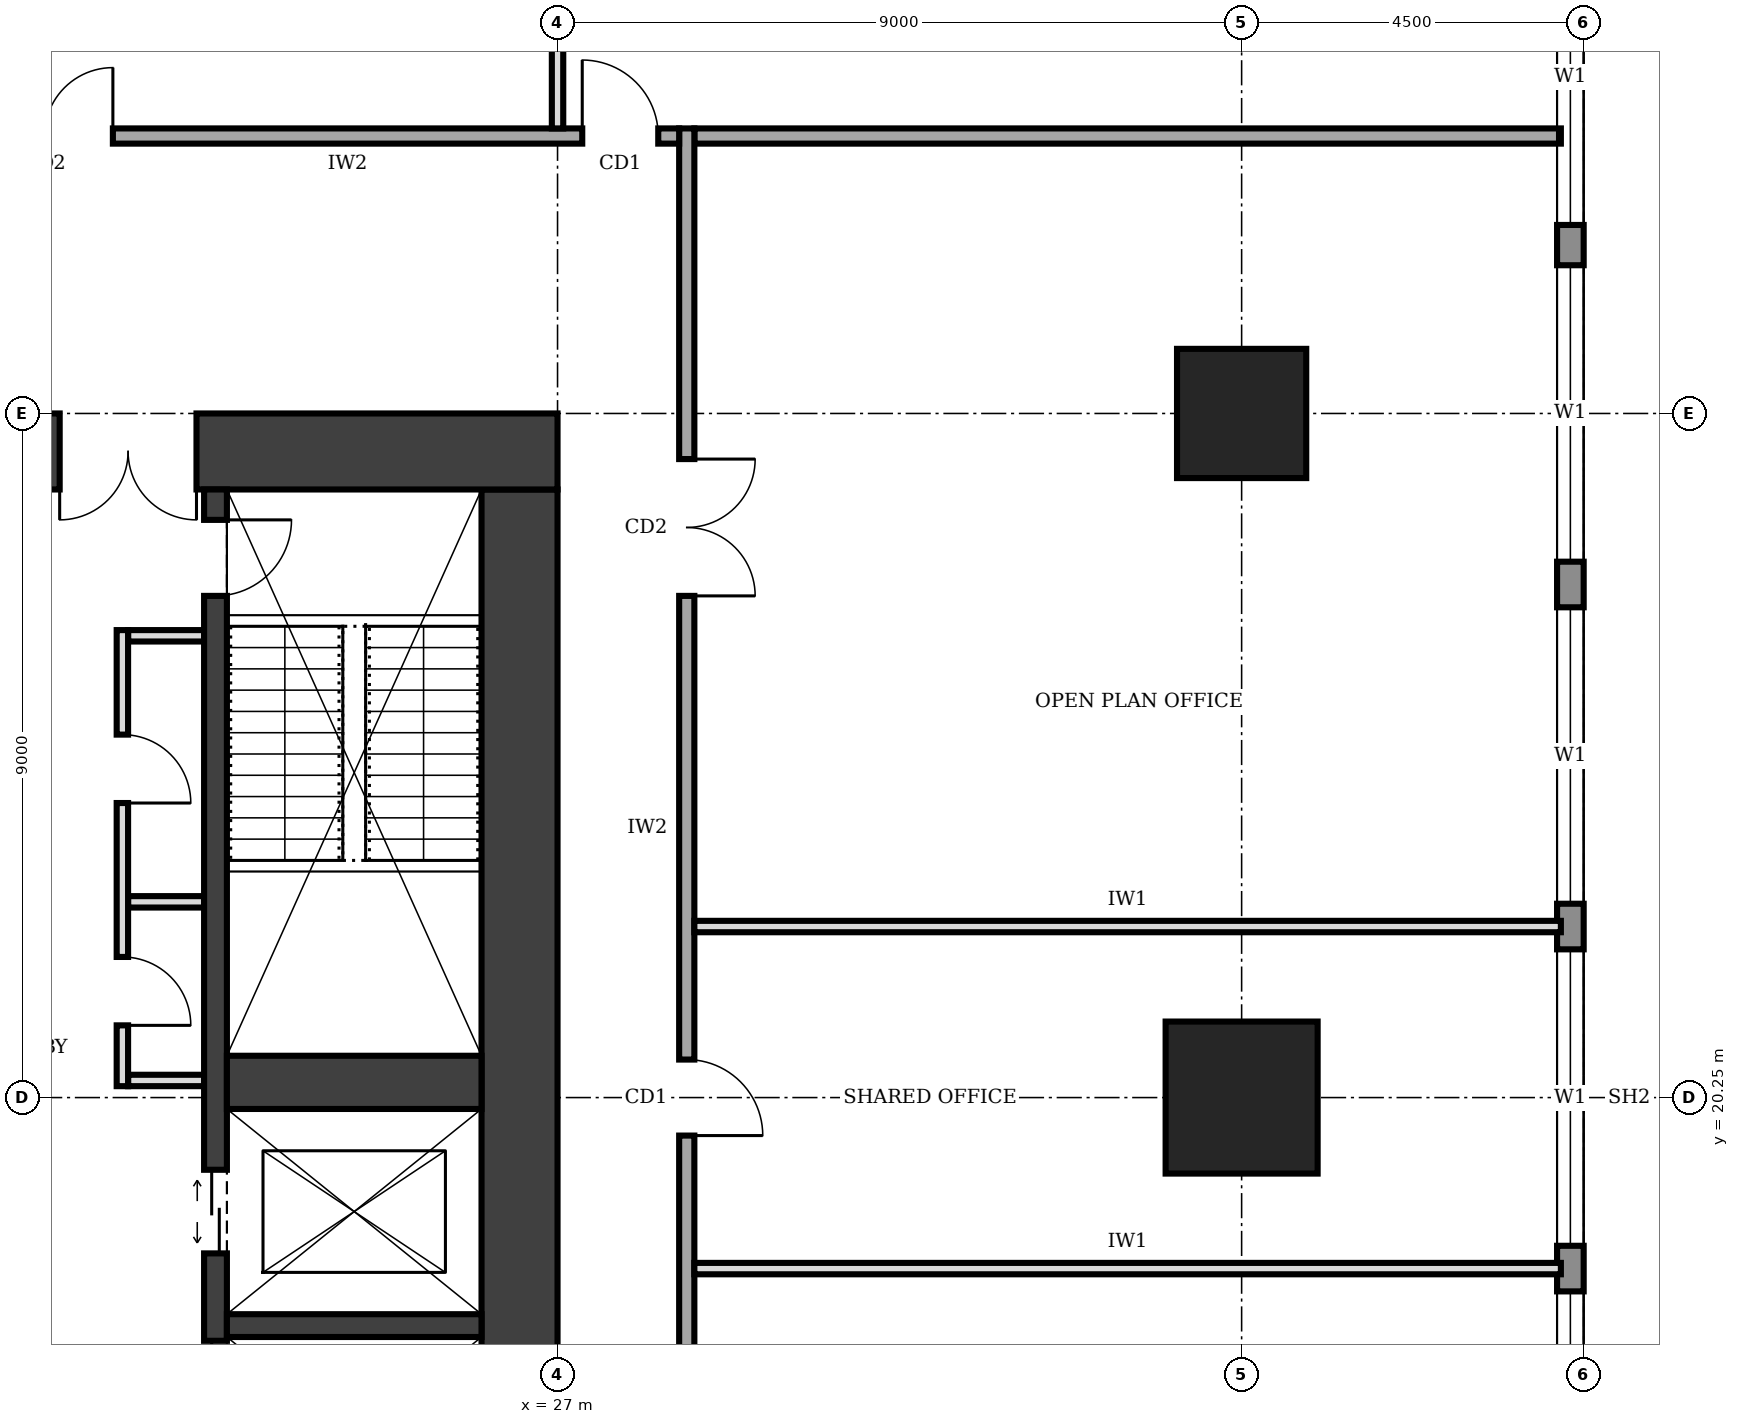
"""IFC4 building model, lengths in metres.
Left out: names, types, materials, properties, quantities, classifications, styles, units other than length and angle.
Written with IfcOpenShell. Run it as: python <this file> out.ifc"""

import sys

from ifc_helpers import new_model, si_unit, direction, frame, frame_2d, origin, origin_2d, place, context, subcontext, project, spatial, rectangle, extrude, element, fill, save


model = new_model("IFC4")
c1 = context("Model", 3, precision=1e-05, world=origin(), true_north=direction((0.0, 1.0)))
c2 = subcontext(c1, "Body", "Model", "MODEL_VIEW")
j1 = project(units=[si_unit("LENGTHUNIT", "METRE"), si_unit("PLANEANGLEUNIT", "RADIAN")], contexts=[c1])
p1 = place(None, origin())
s1 = spatial("IfcSite", under=j1, at=p1, CompositionType="ELEMENT")
p2 = place(p1, origin())
s2 = spatial("IfcBuilding", under=s1, at=p2, CompositionType="ELEMENT")
p3 = place(p2, frame((0.0, 0.0, 273.0)))
s3 = spatial("IfcBuildingStorey", under=s2, at=p3, CompositionType="ELEMENT", Elevation=273.0)
p4 = place(p3, frame((26.5, 12.25, 0.0), z_axis=(0.0, 0.0, 1.0), x_axis=(0.0, 1.0, 0.0)))
e1 = element("IfcWall", 1, at=p4, inside=s3, PredefinedType="SHEAR", context=c2, shape_type="SweptSolid", body=[
    extrude(rectangle(XDim=16.0, YDim=1.0, at=frame_2d((8.0, 0.0))), origin(), (0.0, 0.0, 1.0), 4.0),
])
p5 = place(p3, frame((27.0, 28.75, 0.0), z_axis=(0.0, 0.0, 1.0), x_axis=(-1.0, 0.0, 0.0)))
e2 = element("IfcWall", 2, at=p5, inside=s3, PredefinedType="SHEAR", context=c2, shape_type="SweptSolid", body=[
    extrude(rectangle(XDim=13.5, YDim=1.0, at=frame_2d((6.75, 0.0))), origin(), (0.0, 0.0, 1.0), 4.0),
])
p6 = place(p5, frame((4.75, 0.0, 0.0)))
e3 = element("IfcOpeningElement", 3, at=p6, cuts=e2, PredefinedType="OPENING", context=c2, shape_type="SweptSolid", body=[
    extrude(rectangle(XDim=1.8, YDim=2.1, at=frame_2d((0.9, 1.05))), frame((0.0, 0.51, 0.0), z_axis=(0.0, -1.0, 0.0), x_axis=(1.0, 0.0, 0.0)), (0.0, 0.0, 1.0), 1.02),
])
p7 = place(p3, frame((22.5, 12.25, 0.0), z_axis=(0.0, 0.0, 1.0), x_axis=(0.0, 1.0, 0.0)))
e4 = element("IfcWall", 4, at=p7, inside=s3, PredefinedType="SHEAR", context=c2, shape_type="SweptSolid", body=[
    extrude(rectangle(XDim=16.0, YDim=0.3, at=frame_2d((8.0, 0.0))), origin(), (0.0, 0.0, 1.0), 4.0),
])
p8 = place(p7, frame((14.6, 0.0, 0.0)))
e5 = element("IfcOpeningElement", 5, at=p8, cuts=e4, PredefinedType="OPENING", context=c2, shape_type="SweptSolid", body=[
    extrude(rectangle(XDim=1.0, YDim=2.1, at=frame_2d((0.5, 1.05))), frame((0.0, 0.16, 0.0), z_axis=(0.0, -1.0, 0.0), x_axis=(1.0, 0.0, 0.0)), (0.0, 0.0, 1.0), 0.32),
])
p9 = place(p7, frame((0.375, 0.0, 0.0)))
e6 = element("IfcOpeningElement", 6, at=p9, cuts=e4, PredefinedType="OPENING", context=c2, shape_type="SweptSolid", body=[
    extrude(rectangle(XDim=1.1, YDim=2.1, at=frame_2d((0.55, 1.05))), frame((0.0, 0.16, 0.0), z_axis=(0.0, -1.0, 0.0), x_axis=(1.0, 0.0, 0.0)), (0.0, 0.0, 1.0), 0.32),
])
p10 = place(p7, frame((3.7, 0.0, 0.0)))
e7 = element("IfcOpeningElement", 7, at=p10, cuts=e4, PredefinedType="OPENING", context=c2, shape_type="SweptSolid", body=[
    extrude(rectangle(XDim=1.1, YDim=2.1, at=frame_2d((0.55, 1.05))), frame((0.0, 0.16, 0.0), z_axis=(0.0, -1.0, 0.0), x_axis=(1.0, 0.0, 0.0)), (0.0, 0.0, 1.0), 0.32),
])
p11 = place(p7, frame((5.95, 0.0, 0.0)))
e8 = element("IfcOpeningElement", 8, at=p11, cuts=e4, PredefinedType="OPENING", context=c2, shape_type="SweptSolid", body=[
    extrude(rectangle(XDim=1.1, YDim=2.1, at=frame_2d((0.55, 1.05))), frame((0.0, 0.16, 0.0), z_axis=(0.0, -1.0, 0.0), x_axis=(1.0, 0.0, 0.0)), (0.0, 0.0, 1.0), 0.32),
])
p12 = place(p3, frame((22.65, 17.25, 0.0), z_axis=(0.0, 0.0, 1.0), x_axis=(1.0, 0.0, 0.0)))
e9 = element("IfcWall", 9, at=p12, inside=s3, PredefinedType="SHEAR", context=c2, shape_type="SweptSolid", body=[
    extrude(rectangle(XDim=3.35, YDim=0.3, at=frame_2d((1.675, 0.0))), origin(), (0.0, 0.0, 1.0), 4.0),
])
p13 = place(p3, frame((22.65, 20.45, 0.0), z_axis=(0.0, 0.0, 1.0), x_axis=(1.0, 0.0, 0.0)))
e10 = element("IfcWall", 10, at=p13, inside=s3, PredefinedType="SHEAR", context=c2, shape_type="SweptSolid", body=[
    extrude(rectangle(XDim=3.35, YDim=0.7, at=frame_2d((1.675, 0.0))), origin(), (0.0, 0.0, 1.0), 4.0),
])
p14 = place(p3, frame((36.0, 20.25, 0.0), z_axis=(0.0, 0.0, 1.0), x_axis=(1.0, 0.0, 0.0)))
e11 = element("IfcColumn", 11, at=p14, inside=s3, PredefinedType="COLUMN", context=c2, shape_type="SweptSolid", body=[
    extrude(rectangle(XDim=2.0, YDim=2.0, at=origin_2d()), origin(), (0.0, 0.0, 1.0), 4.0),
])
p15 = place(p3, frame((36.0, 29.25, 0.0), z_axis=(0.0, 0.0, 1.0), x_axis=(1.0, 0.0, 0.0)))
e12 = element("IfcColumn", 12, at=p15, inside=s3, PredefinedType="COLUMN", context=c2, shape_type="SweptSolid", body=[
    extrude(rectangle(XDim=1.7, YDim=1.7, at=origin_2d()), origin(), (0.0, 0.0, 1.0), 4.0),
])
p16 = place(p3, frame((40.325, 4.52, 0.0), z_axis=(0.0, 0.0, 1.0), x_axis=(0.0, 1.0, 0.0)))
e13 = element("IfcWall", 13, at=p16, inside=s3, PredefinedType="STANDARD", context=c2, shape_type="SweptSolid", body=[
    extrude(rectangle(XDim=31.46, YDim=0.35, at=frame_2d((15.73, 0.0))), origin(), (0.0, 0.0, 1.0), 3.75),
])
p17 = place(p16, frame((4.78, 0.0, 0.9)))
e14 = element("IfcOpeningElement", 14, at=p17, cuts=e13, PredefinedType="OPENING", context=c2, shape_type="SweptSolid", body=[
    extrude(rectangle(XDim=3.9, YDim=2.2, at=frame_2d((1.95, 1.1))), frame((0.0, 0.185, 0.0), z_axis=(0.0, -1.0, 0.0), x_axis=(1.0, 0.0, 0.0)), (0.0, 0.0, 1.0), 0.37),
])
p18 = place(p16, frame((9.28, 0.0, 0.9)))
e15 = element("IfcOpeningElement", 15, at=p18, cuts=e13, PredefinedType="OPENING", context=c2, shape_type="SweptSolid", body=[
    extrude(rectangle(XDim=3.9, YDim=2.2, at=frame_2d((1.95, 1.1))), frame((0.0, 0.185, 0.0), z_axis=(0.0, -1.0, 0.0), x_axis=(1.0, 0.0, 0.0)), (0.0, 0.0, 1.0), 0.37),
])
p19 = place(p16, frame((13.78, 0.0, 0.9)))
e16 = element("IfcOpeningElement", 16, at=p19, cuts=e13, PredefinedType="OPENING", context=c2, shape_type="SweptSolid", body=[
    extrude(rectangle(XDim=3.9, YDim=2.2, at=frame_2d((1.95, 1.1))), frame((0.0, 0.185, 0.0), z_axis=(0.0, -1.0, 0.0), x_axis=(1.0, 0.0, 0.0)), (0.0, 0.0, 1.0), 0.37),
])
p20 = place(p16, frame((18.28, 0.0, 0.9)))
e17 = element("IfcOpeningElement", 17, at=p20, cuts=e13, PredefinedType="OPENING", context=c2, shape_type="SweptSolid", body=[
    extrude(rectangle(XDim=3.9, YDim=2.2, at=frame_2d((1.95, 1.1))), frame((0.0, 0.185, 0.0), z_axis=(0.0, -1.0, 0.0), x_axis=(1.0, 0.0, 0.0)), (0.0, 0.0, 1.0), 0.37),
])
p21 = place(p16, frame((22.78, 0.0, 0.9)))
e18 = element("IfcOpeningElement", 18, at=p21, cuts=e13, PredefinedType="OPENING", context=c2, shape_type="SweptSolid", body=[
    extrude(rectangle(XDim=3.9, YDim=2.2, at=frame_2d((1.95, 1.1))), frame((0.0, 0.185, 0.0), z_axis=(0.0, -1.0, 0.0), x_axis=(1.0, 0.0, 0.0)), (0.0, 0.0, 1.0), 0.37),
])
p22 = place(p16, frame((27.21, 0.0, 0.9)))
e19 = element("IfcOpeningElement", 19, at=p22, cuts=e13, PredefinedType="OPENING", context=c2, shape_type="SweptSolid", body=[
    extrude(rectangle(XDim=3.9, YDim=2.2, at=frame_2d((1.95, 1.1))), frame((0.0, 0.185, 0.0), z_axis=(0.0, -1.0, 0.0), x_axis=(1.0, 0.0, 0.0)), (0.0, 0.0, 1.0), 0.37),
])
p23 = place(p3, frame((21.275, 20.4, 0.0), z_axis=(0.0, 0.0, 1.0), x_axis=(0.0, 1.0, 0.0)))
e20 = element("IfcWall", 20, at=p23, inside=s3, PredefinedType="PARTITIONING", context=c2, shape_type="SweptSolid", body=[
    extrude(rectangle(XDim=6.0, YDim=0.15, at=frame_2d((3.0, 0.0))), origin(), (0.0, 0.0, 1.0), 3.75),
])
p24 = place(p23, frame((0.8, 0.0, 0.0)))
e21 = element("IfcOpeningElement", 21, at=p24, cuts=e20, PredefinedType="OPENING", context=c2, shape_type="SweptSolid", body=[
    extrude(rectangle(XDim=0.9, YDim=2.1, at=frame_2d((0.45, 1.05))), frame((0.0, 0.085, 0.0), z_axis=(0.0, -1.0, 0.0), x_axis=(1.0, 0.0, 0.0)), (0.0, 0.0, 1.0), 0.17),
])
p25 = place(p23, frame((3.725, 0.0, 0.0)))
e22 = element("IfcOpeningElement", 22, at=p25, cuts=e20, PredefinedType="OPENING", context=c2, shape_type="SweptSolid", body=[
    extrude(rectangle(XDim=0.9, YDim=2.1, at=frame_2d((0.45, 1.05))), frame((0.0, 0.085, 0.0), z_axis=(0.0, -1.0, 0.0), x_axis=(1.0, 0.0, 0.0)), (0.0, 0.0, 1.0), 0.17),
])
for number, where, z_axis, x_axis in (
    (23, (21.35, 20.475, 0.0), (0.0, 0.0, 1.0), (1.0, 0.0, 0.0)),
    (24, (21.35, 22.825, 0.0), (0.0, 0.0, 1.0), (1.0, 0.0, 0.0)),
    (25, (21.35, 26.325, 0.0), (0.0, 0.0, 1.0), (1.0, 0.0, 0.0)),
):
    element("IfcWall", number, at=place(p3, frame(where, z_axis=z_axis, x_axis=x_axis)), inside=s3, PredefinedType="PARTITIONING", context=c2, shape_type="SweptSolid", body=[
        extrude(rectangle(XDim=1.0, YDim=0.15, at=frame_2d((0.5, 0.0))), origin(), (0.0, 0.0, 1.0), 3.75),
    ])
p26 = place(p3, frame((28.7, 9.2, 0.0), z_axis=(0.0, 0.0, 1.0), x_axis=(0.0, 1.0, 0.0)))
e26 = element("IfcWall", 26, at=p26, inside=s3, PredefinedType="SOLIDWALL", context=c2, shape_type="SweptSolid", body=[
    extrude(rectangle(XDim=23.8, YDim=0.2, at=frame_2d((11.9, 0.0))), origin(), (0.0, 0.0, 1.0), 3.75),
])
p27 = place(p26, frame((3.4, 0.0, 0.0)))
e27 = element("IfcOpeningElement", 27, at=p27, cuts=e26, PredefinedType="OPENING", context=c2, shape_type="SweptSolid", body=[
    extrude(rectangle(XDim=1.8, YDim=2.1, at=frame_2d((0.9, 1.05))), frame((0.0, 0.11, 0.0), z_axis=(0.0, -1.0, 0.0), x_axis=(1.0, 0.0, 0.0)), (0.0, 0.0, 1.0), 0.22),
])
p28 = place(p26, frame((10.55, 0.0, 0.0)))
e28 = element("IfcOpeningElement", 28, at=p28, cuts=e26, PredefinedType="OPENING", context=c2, shape_type="SweptSolid", body=[
    extrude(rectangle(XDim=1.0, YDim=2.1, at=frame_2d((0.5, 1.05))), frame((0.0, 0.11, 0.0), z_axis=(0.0, -1.0, 0.0), x_axis=(1.0, 0.0, 0.0)), (0.0, 0.0, 1.0), 0.22),
])
p29 = place(p26, frame((17.65, 0.0, 0.0)))
e29 = element("IfcOpeningElement", 29, at=p29, cuts=e26, PredefinedType="OPENING", context=c2, shape_type="SweptSolid", body=[
    extrude(rectangle(XDim=1.8, YDim=2.1, at=frame_2d((0.9, 1.05))), frame((0.0, 0.11, 0.0), z_axis=(0.0, -1.0, 0.0), x_axis=(1.0, 0.0, 0.0)), (0.0, 0.0, 1.0), 0.22),
])
p30 = place(p3, frame((28.6, 32.9, 0.0), z_axis=(0.0, 0.0, 1.0), x_axis=(-1.0, 0.0, 0.0)))
e30 = element("IfcWall", 30, at=p30, inside=s3, PredefinedType="SOLIDWALL", context=c2, shape_type="SweptSolid", body=[
    extrude(rectangle(XDim=16.9, YDim=0.2, at=frame_2d((8.45, 0.0))), origin(), (0.0, 0.0, 1.0), 3.75),
])
p31 = place(p30, frame((15.425, 0.0, 0.0)))
e31 = element("IfcOpeningElement", 31, at=p31, cuts=e30, PredefinedType="OPENING", context=c2, shape_type="SweptSolid", body=[
    extrude(rectangle(XDim=1.0, YDim=2.1, at=frame_2d((0.5, 1.05))), frame((0.0, 0.11, 0.0), z_axis=(0.0, -1.0, 0.0), x_axis=(1.0, 0.0, 0.0)), (0.0, 0.0, 1.0), 0.22),
])
p32 = place(p30, frame((7.45, 0.0, 0.0)))
e32 = element("IfcOpeningElement", 32, at=p32, cuts=e30, PredefinedType="OPENING", context=c2, shape_type="SweptSolid", body=[
    extrude(rectangle(XDim=1.8, YDim=2.1, at=frame_2d((0.9, 1.05))), frame((0.0, 0.11, 0.0), z_axis=(0.0, -1.0, 0.0), x_axis=(1.0, 0.0, 0.0)), (0.0, 0.0, 1.0), 0.22),
])
p33 = place(p30, frame((0.275, 0.0, 0.0)))
e33 = element("IfcOpeningElement", 33, at=p33, cuts=e30, PredefinedType="OPENING", context=c2, shape_type="SweptSolid", body=[
    extrude(rectangle(XDim=1.0, YDim=2.1, at=frame_2d((0.5, 1.05))), frame((0.0, 0.11, 0.0), z_axis=(0.0, -1.0, 0.0), x_axis=(1.0, 0.0, 0.0)), (0.0, 0.0, 1.0), 0.22),
])
p34 = place(p3, frame((28.8, 32.9, 0.0), z_axis=(0.0, 0.0, 1.0), x_axis=(1.0, 0.0, 0.0)))
e34 = element("IfcWall", 34, at=p34, inside=s3, PredefinedType="SOLIDWALL", context=c2, shape_type="SweptSolid", body=[
    extrude(rectangle(XDim=11.4, YDim=0.2, at=frame_2d((5.7, 0.0))), origin(), (0.0, 0.0, 1.0), 3.75),
])
p35 = place(p3, frame((27.0, 33.0, 0.0), z_axis=(0.0, 0.0, 1.0), x_axis=(0.0, 1.0, 0.0)))
e35 = element("IfcWall", 35, at=p35, inside=s3, PredefinedType="PARTITIONING", context=c2, shape_type="SweptSolid", body=[
    extrude(rectangle(XDim=2.33, YDim=0.15, at=frame_2d((1.165, 0.0))), origin(), (0.0, 0.0, 1.0), 2.85),
])
for number, where, z_axis, x_axis in (
    (36, (28.8, 18.0, 0.0), (0.0, 0.0, 1.0), (1.0, 0.0, 0.0)),
    (37, (28.8, 22.5, 0.0), (0.0, 0.0, 1.0), (1.0, 0.0, 0.0)),
):
    element("IfcWall", number, at=place(p3, frame(where, z_axis=z_axis, x_axis=x_axis)), inside=s3, PredefinedType="PARTITIONING", context=c2, shape_type="SweptSolid", body=[
        extrude(rectangle(XDim=11.4, YDim=0.15, at=frame_2d((5.7, 0.0))), origin(), (0.0, 0.0, 1.0), 3.75),
    ])
p36 = place(p18, origin())
e38 = element("IfcWindow", 38, at=p36, inside=s3, PartitioningType="SINGLE_PANEL", PredefinedType="WINDOW", context=c2, shape_type="SweptSolid", body=[
    extrude(rectangle(XDim=3.9, YDim=2.2, at=frame_2d((1.95, 1.1))), frame((0.0, 0.03, 0.0), z_axis=(0.0, -1.0, 0.0), x_axis=(1.0, 0.0, 0.0)), (0.0, 0.0, 1.0), 0.06),
])
fill(e15, e38)
p37 = place(p19, origin())
e39 = element("IfcWindow", 39, at=p37, inside=s3, PartitioningType="SINGLE_PANEL", PredefinedType="WINDOW", context=c2, shape_type="SweptSolid", body=[
    extrude(rectangle(XDim=3.9, YDim=2.2, at=frame_2d((1.95, 1.1))), frame((0.0, 0.03, 0.0), z_axis=(0.0, -1.0, 0.0), x_axis=(1.0, 0.0, 0.0)), (0.0, 0.0, 1.0), 0.06),
])
fill(e16, e39)
p38 = place(p20, origin())
e40 = element("IfcWindow", 40, at=p38, inside=s3, PartitioningType="SINGLE_PANEL", PredefinedType="WINDOW", context=c2, shape_type="SweptSolid", body=[
    extrude(rectangle(XDim=3.9, YDim=2.2, at=frame_2d((1.95, 1.1))), frame((0.0, 0.03, 0.0), z_axis=(0.0, -1.0, 0.0), x_axis=(1.0, 0.0, 0.0)), (0.0, 0.0, 1.0), 0.06),
])
fill(e17, e40)
p39 = place(p21, origin())
e41 = element("IfcWindow", 41, at=p39, inside=s3, PartitioningType="SINGLE_PANEL", PredefinedType="WINDOW", context=c2, shape_type="SweptSolid", body=[
    extrude(rectangle(XDim=3.9, YDim=2.2, at=frame_2d((1.95, 1.1))), frame((0.0, 0.03, 0.0), z_axis=(0.0, -1.0, 0.0), x_axis=(1.0, 0.0, 0.0)), (0.0, 0.0, 1.0), 0.06),
])
fill(e18, e41)
p40 = place(p22, origin())
e42 = element("IfcWindow", 42, at=p40, inside=s3, PartitioningType="SINGLE_PANEL", PredefinedType="WINDOW", context=c2, shape_type="SweptSolid", body=[
    extrude(rectangle(XDim=3.9, YDim=2.2, at=frame_2d((1.95, 1.1))), frame((0.0, 0.03, 0.0), z_axis=(0.0, -1.0, 0.0), x_axis=(1.0, 0.0, 0.0)), (0.0, 0.0, 1.0), 0.06),
])
fill(e19, e42)
p41 = place(p6, origin())
e43 = element("IfcDoor", 43, at=p41, inside=s3, OperationType="DOUBLE_DOOR_SINGLE_SWING", PredefinedType="DOOR", context=c2, shape_type="SweptSolid", body=[
    extrude(rectangle(XDim=1.8, YDim=2.1, at=frame_2d((0.9, 1.05))), frame((0.0, 0.025, 0.0), z_axis=(0.0, -1.0, 0.0), x_axis=(1.0, 0.0, 0.0)), (0.0, 0.0, 1.0), 0.05),
])
fill(e3, e43)
p42 = place(p8, frame((1.0, 0.0, 0.0), z_axis=(0.0, 0.0, 1.0), x_axis=(-1.0, 0.0, 0.0)))
e44 = element("IfcDoor", 44, at=p42, inside=s3, OperationType="SINGLE_SWING_LEFT", PredefinedType="DOOR", context=c2, shape_type="SweptSolid", body=[
    extrude(rectangle(XDim=1.0, YDim=2.1, at=frame_2d((0.5, 1.05))), frame((0.0, 0.025, 0.0), z_axis=(0.0, -1.0, 0.0), x_axis=(1.0, 0.0, 0.0)), (0.0, 0.0, 1.0), 0.05),
])
fill(e5, e44)
p43 = place(p10, origin())
e45 = element("IfcDoor", 45, at=p43, inside=s3, OperationType="DOUBLE_DOOR_SLIDING", PredefinedType="DOOR", context=c2, shape_type="SweptSolid", body=[
    extrude(rectangle(XDim=1.1, YDim=2.1, at=frame_2d((0.55, 1.05))), frame((0.0, 0.025, 0.0), z_axis=(0.0, -1.0, 0.0), x_axis=(1.0, 0.0, 0.0)), (0.0, 0.0, 1.0), 0.05),
])
fill(e7, e45)
p44 = place(p11, origin())
e46 = element("IfcDoor", 46, at=p44, inside=s3, OperationType="DOUBLE_DOOR_SLIDING", PredefinedType="DOOR", context=c2, shape_type="SweptSolid", body=[
    extrude(rectangle(XDim=1.1, YDim=2.1, at=frame_2d((0.55, 1.05))), frame((0.0, 0.025, 0.0), z_axis=(0.0, -1.0, 0.0), x_axis=(1.0, 0.0, 0.0)), (0.0, 0.0, 1.0), 0.05),
])
fill(e8, e46)
p45 = place(p24, frame((0.9, 0.0, 0.0), z_axis=(0.0, 0.0, 1.0), x_axis=(-1.0, 0.0, 0.0)))
e47 = element("IfcDoor", 47, at=p45, inside=s3, OperationType="SINGLE_SWING_RIGHT", PredefinedType="DOOR", context=c2, shape_type="SweptSolid", body=[
    extrude(rectangle(XDim=0.9, YDim=2.1, at=frame_2d((0.45, 1.05))), frame((0.0, 0.025, 0.0), z_axis=(0.0, -1.0, 0.0), x_axis=(1.0, 0.0, 0.0)), (0.0, 0.0, 1.0), 0.05),
])
fill(e21, e47)
p46 = place(p25, frame((0.9, 0.0, 0.0), z_axis=(0.0, 0.0, 1.0), x_axis=(-1.0, 0.0, 0.0)))
e48 = element("IfcDoor", 48, at=p46, inside=s3, OperationType="SINGLE_SWING_RIGHT", PredefinedType="DOOR", context=c2, shape_type="SweptSolid", body=[
    extrude(rectangle(XDim=0.9, YDim=2.1, at=frame_2d((0.45, 1.05))), frame((0.0, 0.025, 0.0), z_axis=(0.0, -1.0, 0.0), x_axis=(1.0, 0.0, 0.0)), (0.0, 0.0, 1.0), 0.05),
])
fill(e22, e48)
p47 = place(p28, frame((1.0, 0.0, 0.0), z_axis=(0.0, 0.0, 1.0), x_axis=(-1.0, 0.0, 0.0)))
e49 = element("IfcDoor", 49, at=p47, inside=s3, OperationType="SINGLE_SWING_RIGHT", PredefinedType="DOOR", context=c2, shape_type="SweptSolid", body=[
    extrude(rectangle(XDim=1.0, YDim=2.1, at=frame_2d((0.5, 1.05))), frame((0.0, 0.025, 0.0), z_axis=(0.0, -1.0, 0.0), x_axis=(1.0, 0.0, 0.0)), (0.0, 0.0, 1.0), 0.05),
])
fill(e28, e49)
p48 = place(p29, frame((1.8, 0.0, 0.0), z_axis=(0.0, 0.0, 1.0), x_axis=(-1.0, 0.0, 0.0)))
e50 = element("IfcDoor", 50, at=p48, inside=s3, OperationType="DOUBLE_DOOR_SINGLE_SWING", PredefinedType="DOOR", context=c2, shape_type="SweptSolid", body=[
    extrude(rectangle(XDim=1.8, YDim=2.1, at=frame_2d((0.9, 1.05))), frame((0.0, 0.025, 0.0), z_axis=(0.0, -1.0, 0.0), x_axis=(1.0, 0.0, 0.0)), (0.0, 0.0, 1.0), 0.05),
])
fill(e29, e50)
p49 = place(p32, frame((1.8, 0.0, 0.0), z_axis=(0.0, 0.0, 1.0), x_axis=(-1.0, 0.0, 0.0)))
e51 = element("IfcDoor", 51, at=p49, inside=s3, OperationType="DOUBLE_DOOR_SINGLE_SWING", PredefinedType="DOOR", context=c2, shape_type="SweptSolid", body=[
    extrude(rectangle(XDim=1.8, YDim=2.1, at=frame_2d((0.9, 1.05))), frame((0.0, 0.025, 0.0), z_axis=(0.0, -1.0, 0.0), x_axis=(1.0, 0.0, 0.0)), (0.0, 0.0, 1.0), 0.05),
])
fill(e32, e51)
p50 = place(p33, frame((1.0, 0.0, 0.0), z_axis=(0.0, 0.0, 1.0), x_axis=(-1.0, 0.0, 0.0)))
e52 = element("IfcDoor", 52, at=p50, inside=s3, OperationType="SINGLE_SWING_LEFT", PredefinedType="DOOR", context=c2, shape_type="SweptSolid", body=[
    extrude(rectangle(XDim=1.0, YDim=2.1, at=frame_2d((0.5, 1.05))), frame((0.0, 0.025, 0.0), z_axis=(0.0, -1.0, 0.0), x_axis=(1.0, 0.0, 0.0)), (0.0, 0.0, 1.0), 0.05),
])
fill(e33, e52)
save(model, sys.argv[1])
